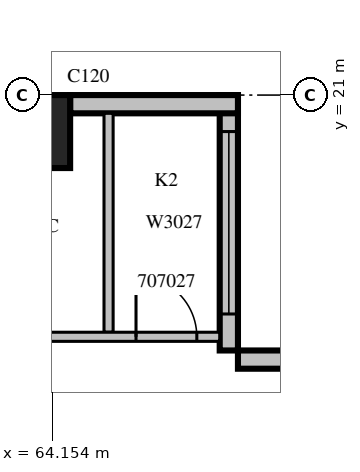
"""IFC4 building model, lengths in metres.
Left out: names, types, materials, properties, quantities, classifications, styles, units other than length and angle.
Written with IfcOpenShell. Run it as: python <this file> out.ifc"""

import sys

from ifc_helpers import new_model, si_unit, direction, frame, frame_2d, origin, origin_2d, place, context, subcontext, project, spatial, rectangle, extrude, source, transform, mapped, element, fill, save


model = new_model("IFC4")
c1 = context("Model", 3, precision=1e-05, world=origin(), true_north=direction((0.0, 1.0)))
c2 = subcontext(c1, "Body", "Model", "MODEL_VIEW")
j1 = project(units=[si_unit("LENGTHUNIT", "METRE"), si_unit("PLANEANGLEUNIT", "RADIAN")], contexts=[c1])
p1 = place(None, origin())
s1 = spatial("IfcSite", under=j1, at=p1, CompositionType="ELEMENT")
p2 = place(p1, origin())
s2 = spatial("IfcBuilding", under=s1, at=p2, CompositionType="ELEMENT")
p3 = place(p2, frame((0.0, 0.0, 40.5)))
s3 = spatial("IfcBuildingStorey", under=s2, at=p3, CompositionType="ELEMENT", Elevation=40.5)
m1 = source(origin(), c2, "Body", "SweptSolid", [
    extrude(rectangle(XDim=1.2, YDim=1.2, at=origin_2d()), origin(), (0.0, 0.0, 1.0), 4.2),
])
p4 = place(p3, frame((63.84, 20.4, 0.0), z_axis=(0.0, 0.0, 1.0), x_axis=(1.0, 0.0, 0.0)))
e1 = element("IfcColumn", 1, at=p4, inside=s3, PredefinedType="COLUMN", context=c2, shape_type="MappedRepresentation", body=[
    mapped(m1, transform((0.0, 0.0, 0.0), scale=1.0)),
])
m2 = source(origin(), c2, "Body", "SweptSolid", [
    extrude(rectangle(XDim=4.2, YDim=0.3, at=frame_2d((2.1, 0.0))), origin(), (0.0, 0.0, 1.0), 3.8),
])
p5 = place(p3, frame((71.4, 16.65, 0.0), z_axis=(0.0, 0.0, 1.0), x_axis=(-1.0, 0.0, 0.0)))
e2 = element("IfcWall", 2, at=p5, inside=s3, PredefinedType="STANDARD", context=c2, shape_type="MappedRepresentation", body=[
    mapped(m2, transform((0.0, 0.0, 0.0), scale=1.0)),
])
m3 = source(origin(), c2, "Body", "SweptSolid", [
    extrude(rectangle(XDim=1.2, YDim=2.7, at=frame_2d((0.6, 1.35))), frame((0.0, 0.16, 0.0), z_axis=(0.0, -1.0, 0.0), x_axis=(1.0, 0.0, 0.0)), (0.0, 0.0, 1.0), 0.32),
])
p6 = place(p5, frame((0.66, 0.0, 0.6)))
e3 = element("IfcOpeningElement", 3, at=p6, cuts=e2, PredefinedType="OPENING", context=c2, shape_type="MappedRepresentation", body=[
    mapped(m3, transform((0.0, 0.0, 0.0), scale=1.0)),
])
p7 = place(p3, frame((67.05, 16.8, 0.0), z_axis=(0.0, 0.0, 1.0), x_axis=(0.0, 1.0, 0.0)))
e4 = element("IfcWall", 4, at=p7, inside=s3, PredefinedType="STANDARD", context=c2, shape_type="MappedRepresentation", body=[
    mapped(m2, transform((0.0, 0.0, 0.0), scale=1.0)),
])
m4 = source(origin(), c2, "Body", "SweptSolid", [
    extrude(rectangle(XDim=3.0, YDim=2.7, at=frame_2d((1.5, 1.35))), frame((0.0, 0.16, 0.0), z_axis=(0.0, -1.0, 0.0), x_axis=(1.0, 0.0, 0.0)), (0.0, 0.0, 1.0), 0.32),
])
p8 = place(p7, frame((0.6, 0.0, 0.6)))
e5 = element("IfcOpeningElement", 5, at=p8, cuts=e4, PredefinedType="OPENING", context=c2, shape_type="MappedRepresentation", body=[
    mapped(m4, transform((0.0, 0.0, 0.0), scale=1.0)),
])
m5 = source(origin(), c2, "Body", "SweptSolid", [
    extrude(rectangle(XDim=2.76, YDim=0.3, at=frame_2d((1.38, 0.0))), origin(), (0.0, 0.0, 1.0), 3.8),
])
p9 = place(p3, frame((67.2, 20.85, 0.0), z_axis=(0.0, 0.0, 1.0), x_axis=(-1.0, 0.0, 0.0)))
e6 = element("IfcWall", 6, at=p9, inside=s3, PredefinedType="STANDARD", context=c2, shape_type="MappedRepresentation", body=[
    mapped(m5, transform((0.0, 0.0, 0.0), scale=1.0)),
])
m6 = source(origin(), c2, "Body", "SweptSolid", [
    extrude(rectangle(XDim=3.6, YDim=0.15, at=frame_2d((1.8, 0.0))), origin(), (0.0, 0.0, 1.0), 3.8),
])
p10 = place(p3, frame((65.072, 20.7, 0.0), z_axis=(0.0, 0.0, 1.0), x_axis=(0.0, -1.0, 0.0)))
e7 = element("IfcWall", 7, at=p10, inside=s3, PredefinedType="PARTITIONING", context=c2, shape_type="MappedRepresentation", body=[
    mapped(m6, transform((0.0, 0.0, 0.0), scale=1.0)),
])
p11 = place(p3, frame((29.4, 17.025, 0.0), z_axis=(0.0, 0.0, 1.0), x_axis=(1.0, 0.0, 0.0)))
e8 = element("IfcWall", 8, at=p11, inside=s3, PredefinedType="PARTITIONING", context=c2, shape_type="SweptSolid", body=[
    extrude(rectangle(XDim=37.5, YDim=0.15, at=frame_2d((18.75, 0.0))), origin(), (0.0, 0.0, 1.0), 3.8),
])
m7 = source(origin(), c2, "Body", "SweptSolid", [
    extrude(rectangle(XDim=1.0, YDim=2.1, at=frame_2d((0.5, 1.05))), frame((0.0, 0.085, 0.0), z_axis=(0.0, -1.0, 0.0), x_axis=(1.0, 0.0, 0.0)), (0.0, 0.0, 1.0), 0.17),
])
p12 = place(p11, frame((1.357, 0.0, 0.0)))
e9 = element("IfcOpeningElement", 9, at=p12, cuts=e8, PredefinedType="OPENING", context=c2, shape_type="MappedRepresentation", body=[
    mapped(m7, transform((0.0, 0.0, 0.0), scale=1.0)),
])
p13 = place(p11, frame((4.669, 0.0, 0.0)))
e10 = element("IfcOpeningElement", 10, at=p13, cuts=e8, PredefinedType="OPENING", context=c2, shape_type="MappedRepresentation", body=[
    mapped(m7, transform((0.0, 0.0, 0.0), scale=1.0)),
])
p14 = place(p11, frame((7.012, 0.0, 0.0)))
e11 = element("IfcOpeningElement", 11, at=p14, cuts=e8, PredefinedType="OPENING", context=c2, shape_type="MappedRepresentation", body=[
    mapped(m7, transform((0.0, 0.0, 0.0), scale=1.0)),
])
m8 = source(origin(), c2, "Body", "SweptSolid", [
    extrude(rectangle(XDim=1.2, YDim=2.1, at=frame_2d((0.6, 1.05))), frame((0.0, 0.085, 0.0), z_axis=(0.0, -1.0, 0.0), x_axis=(1.0, 0.0, 0.0)), (0.0, 0.0, 1.0), 0.17),
])
p15 = place(p11, frame((12.0, 0.0, 0.0)))
e12 = element("IfcOpeningElement", 12, at=p15, cuts=e8, PredefinedType="OPENING", context=c2, shape_type="MappedRepresentation", body=[
    mapped(m8, transform((0.0, 0.0, 0.0), scale=1.0)),
])
p16 = place(p11, frame((19.24, 0.0, 0.0)))
e13 = element("IfcOpeningElement", 13, at=p16, cuts=e8, PredefinedType="OPENING", context=c2, shape_type="MappedRepresentation", body=[
    mapped(m7, transform((0.0, 0.0, 0.0), scale=1.0)),
])
m9 = source(origin(), c2, "Body", "SweptSolid", [
    extrude(rectangle(XDim=0.9, YDim=2.1, at=frame_2d((0.45, 1.05))), frame((0.0, 0.085, 0.0), z_axis=(0.0, -1.0, 0.0), x_axis=(1.0, 0.0, 0.0)), (0.0, 0.0, 1.0), 0.17),
])
p17 = place(p11, frame((25.17, 0.0, 0.0)))
e14 = element("IfcOpeningElement", 14, at=p17, cuts=e8, PredefinedType="OPENING", context=c2, shape_type="MappedRepresentation", body=[
    mapped(m9, transform((0.0, 0.0, 0.0), scale=1.0)),
])
p18 = place(p11, frame((30.052, 0.0, 0.0)))
e15 = element("IfcOpeningElement", 15, at=p18, cuts=e8, PredefinedType="OPENING", context=c2, shape_type="MappedRepresentation", body=[
    mapped(m7, transform((0.0, 0.0, 0.0), scale=1.0)),
])
p19 = place(p11, frame((33.608, 0.0, 0.0)))
e16 = element("IfcOpeningElement", 16, at=p19, cuts=e8, PredefinedType="OPENING", context=c2, shape_type="MappedRepresentation", body=[
    mapped(m7, transform((0.0, 0.0, 0.0), scale=1.0)),
])
p20 = place(p11, frame((36.124, 0.0, 0.0)))
e17 = element("IfcOpeningElement", 17, at=p20, cuts=e8, PredefinedType="OPENING", context=c2, shape_type="MappedRepresentation", body=[
    mapped(m7, transform((0.0, 0.0, 0.0), scale=1.0)),
])
m10 = source(origin(), c2, "Body", "SweptSolid", [
    extrude(rectangle(XDim=3.0, YDim=2.7, at=frame_2d((1.5, 1.35))), frame((0.0, 0.03, 0.0), z_axis=(0.0, -1.0, 0.0), x_axis=(1.0, 0.0, 0.0)), (0.0, 0.0, 1.0), 0.06),
])
p21 = place(p8, origin())
e18 = element("IfcWindow", 18, at=p21, inside=s3, PartitioningType="SINGLE_PANEL", PredefinedType="WINDOW", context=c2, shape_type="MappedRepresentation", body=[
    mapped(m10, transform((0.0, 0.0, 0.0), scale=1.0)),
])
fill(e5, e18)
m11 = source(origin(), c2, "Body", "SweptSolid", [
    extrude(rectangle(XDim=1.0, YDim=2.1, at=frame_2d((0.5, 1.05))), frame((0.0, 0.025, 0.0), z_axis=(0.0, -1.0, 0.0), x_axis=(1.0, 0.0, 0.0)), (0.0, 0.0, 1.0), 0.05),
])
p22 = place(p20, origin())
e19 = element("IfcDoor", 19, at=p22, inside=s3, OperationType="SINGLE_SWING_LEFT", PredefinedType="DOOR", context=c2, shape_type="MappedRepresentation", body=[
    mapped(m11, transform((0.0, 0.0, 0.0), scale=1.0)),
])
fill(e17, e19)
save(model, sys.argv[1])
